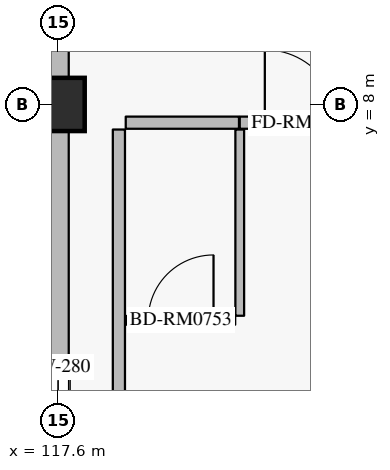
"""IFC4 building model, lengths in metres.
Left out: names, types, materials, properties, quantities, classifications, styles, units other than length and angle.
Written with IfcOpenShell. Run it as: python <this file> out.ifc"""

import sys

from ifc_helpers import new_model, si_unit, direction, frame, frame_2d, origin, origin_2d, place, context, subcontext, project, spatial, rectangle, extrude, element, fill, save


model = new_model("IFC4")
c1 = context("Model", 3, precision=1e-05, world=origin(), true_north=direction((0.0, 1.0)))
c2 = subcontext(c1, "Body", "Model", "MODEL_VIEW")
j1 = project(units=[si_unit("LENGTHUNIT", "METRE"), si_unit("PLANEANGLEUNIT", "RADIAN")], contexts=[c1])
p1 = place(None, origin())
s1 = spatial("IfcSite", under=j1, at=p1, CompositionType="ELEMENT")
p2 = place(p1, origin())
s2 = spatial("IfcBuilding", under=s1, at=p2, CompositionType="ELEMENT")
p3 = place(p2, frame((0.0, 0.0, 28.8)))
s3 = spatial("IfcBuildingStorey", under=s2, at=p3, CompositionType="ELEMENT", Elevation=28.8)
p4 = place(p3, frame((117.6, 8.0, 0.0), z_axis=(0.0, 0.0, 1.0), x_axis=(1.0, 0.0, 0.0)))
e1 = element("IfcColumn", 1, at=p4, inside=s3, PredefinedType="COLUMN", context=c2, shape_type="SweptSolid", body=[
    extrude(rectangle(XDim=0.7, YDim=0.7, at=origin_2d()), origin(), (0.0, 0.0, 1.0), 3.6),
])
p5 = place(p3, frame((117.6, 0.35, 0.0), z_axis=(0.0, 0.0, 1.0), x_axis=(0.0, 1.0, 0.0)))
e2 = element("IfcWall", 2, at=p5, inside=s3, PredefinedType="SOLIDWALL", context=c2, shape_type="SweptSolid", body=[
    extrude(rectangle(XDim=7.3, YDim=0.28, at=frame_2d((3.65, 0.0))), origin(), (0.0, 0.0, 1.0), 2.7),
])
p6 = place(p5, frame((3.0, 0.0, 0.5)))
e3 = element("IfcOpeningElement", 3, at=p6, cuts=e2, PredefinedType="OPENING", context=c2, shape_type="SweptSolid", body=[
    extrude(rectangle(XDim=1.3, YDim=1.65, at=frame_2d((0.65, 0.825))), frame((0.0, 0.15, 0.0), z_axis=(0.0, -1.0, 0.0), x_axis=(1.0, 0.0, 0.0)), (0.0, 0.0, 1.0), 0.3),
])
p7 = place(p3, frame((117.6, 8.35, 0.0), z_axis=(0.0, 0.0, 1.0), x_axis=(0.0, 1.0, 0.0)))
e4 = element("IfcWall", 4, at=p7, inside=s3, PredefinedType="SOLIDWALL", context=c2, shape_type="SweptSolid", body=[
    extrude(rectangle(XDim=7.3, YDim=0.28, at=frame_2d((3.65, 0.0))), origin(), (0.0, 0.0, 1.0), 2.7),
])
p8 = place(p7, frame((3.0, 0.0, 0.5)))
e5 = element("IfcOpeningElement", 5, at=p8, cuts=e4, PredefinedType="OPENING", context=c2, shape_type="SweptSolid", body=[
    extrude(rectangle(XDim=1.3, YDim=1.65, at=frame_2d((0.65, 0.825))), frame((0.0, 0.15, 0.0), z_axis=(0.0, -1.0, 0.0), x_axis=(1.0, 0.0, 0.0)), (0.0, 0.0, 1.0), 0.3),
])
p9 = place(p3, frame((118.49, 7.76, 0.0), z_axis=(0.0, 0.0, 1.0), x_axis=(1.0, 0.0, 0.0)))
e6 = element("IfcWall", 6, at=p9, inside=s3, PredefinedType="PARTITIONING", context=c2, shape_type="SweptSolid", body=[
    extrude(rectangle(XDim=1.49, YDim=0.16, at=frame_2d((0.745, 0.0))), origin(), (0.0, 0.0, 1.0), 3.365),
])
p10 = place(p3, frame((119.99, 7.76, 0.0), z_axis=(0.0, 0.0, 1.0), x_axis=(1.0, 0.0, 0.0)))
e7 = element("IfcWall", 7, at=p10, inside=s3, PredefinedType="PARTITIONING", context=c2, shape_type="SweptSolid", body=[
    extrude(rectangle(XDim=1.62, YDim=0.16, at=frame_2d((0.81, 0.0))), origin(), (0.0, 0.0, 1.0), 3.365),
])
p11 = place(p10, frame((0.33, 0.0, 0.0)))
e8 = element("IfcOpeningElement", 8, at=p11, cuts=e7, PredefinedType="OPENING", context=c2, shape_type="SweptSolid", body=[
    extrude(rectangle(XDim=0.96, YDim=2.2, at=frame_2d((0.48, 1.1))), frame((0.0, 0.09, 0.0), z_axis=(0.0, -1.0, 0.0), x_axis=(1.0, 0.0, 0.0)), (0.0, 0.0, 1.0), 0.18),
])
p12 = place(p3, frame((119.99, 5.22, 0.0), z_axis=(0.0, 0.0, 1.0), x_axis=(0.0, 1.0, 0.0)))
e9 = element("IfcWall", 9, at=p12, inside=s3, PredefinedType="PARTITIONING", context=c2, shape_type="SweptSolid", body=[
    extrude(rectangle(XDim=2.45, YDim=0.115, at=frame_2d((1.225, 0.0))), origin(), (0.0, 0.0, 1.0), 3.365),
])
p13 = place(p3, frame((118.5, 5.16, 0.0), z_axis=(0.0, 0.0, 1.0), x_axis=(1.0, 0.0, 0.0)))
e10 = element("IfcWall", 10, at=p13, inside=s3, PredefinedType="PARTITIONING", context=c2, shape_type="SweptSolid", body=[
    extrude(rectangle(XDim=1.43, YDim=0.115, at=frame_2d((0.715, 0.0))), origin(), (0.0, 0.0, 1.0), 3.365),
])
p14 = place(p13, frame((0.285, 0.0, 0.0)))
e11 = element("IfcOpeningElement", 11, at=p14, cuts=e10, PredefinedType="OPENING", context=c2, shape_type="SweptSolid", body=[
    extrude(rectangle(XDim=0.86, YDim=2.12, at=frame_2d((0.43, 1.06))), frame((0.0, 0.067, 0.0), z_axis=(0.0, -1.0, 0.0), x_axis=(1.0, 0.0, 0.0)), (0.0, 0.0, 1.0), 0.135),
])
p15 = place(p3, frame((118.4, 0.34, 0.0), z_axis=(0.0, 0.0, 1.0), x_axis=(0.0, 1.0, 0.0)))
e12 = element("IfcWall", 12, at=p15, inside=s3, PredefinedType="PARTITIONING", context=c2, shape_type="SweptSolid", body=[
    extrude(rectangle(XDim=7.33, YDim=0.16, at=frame_2d((3.665, 0.0))), origin(), (0.0, 0.0, 1.0), 3.365),
])
p16 = place(p6, origin())
e13 = element("IfcWindow", 13, at=p16, inside=s3, PartitioningType="SINGLE_PANEL", PredefinedType="WINDOW", context=c2, shape_type="SweptSolid", body=[
    extrude(rectangle(XDim=1.3, YDim=1.65, at=frame_2d((0.65, 0.825))), frame((0.0, 0.03, 0.0), z_axis=(0.0, -1.0, 0.0), x_axis=(1.0, 0.0, 0.0)), (0.0, 0.0, 1.0), 0.06),
])
fill(e3, e13)
p17 = place(p11, origin())
e14 = element("IfcDoor", 14, at=p17, inside=s3, OperationType="SINGLE_SWING_LEFT", PredefinedType="DOOR", context=c2, shape_type="SweptSolid", body=[
    extrude(rectangle(XDim=0.96, YDim=2.2, at=frame_2d((0.48, 1.1))), frame((0.0, 0.025, 0.0), z_axis=(0.0, -1.0, 0.0), x_axis=(1.0, 0.0, 0.0)), (0.0, 0.0, 1.0), 0.05),
])
fill(e8, e14)
p18 = place(p14, origin())
e15 = element("IfcDoor", 15, at=p18, inside=s3, OperationType="SINGLE_SWING_RIGHT", PredefinedType="DOOR", context=c2, shape_type="SweptSolid", body=[
    extrude(rectangle(XDim=0.86, YDim=2.12, at=frame_2d((0.43, 1.06))), frame((0.0, 0.025, 0.0), z_axis=(0.0, -1.0, 0.0), x_axis=(1.0, 0.0, 0.0)), (0.0, 0.0, 1.0), 0.05),
])
fill(e11, e15)
save(model, sys.argv[1])
